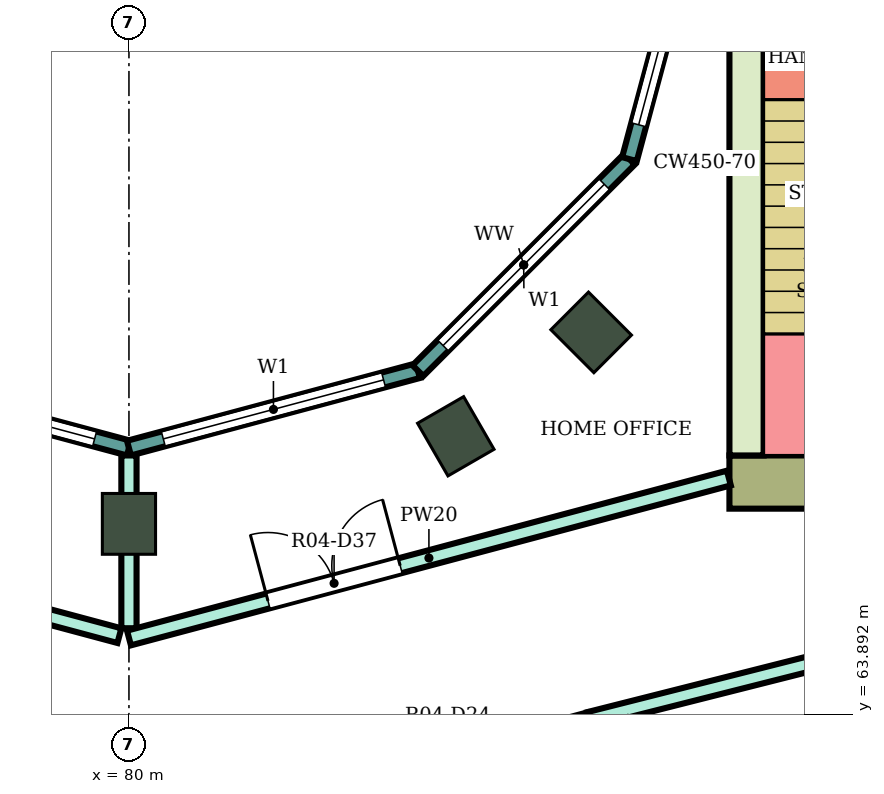
"""IFC4 building model, lengths in metres.
Left out: names, types, materials, properties, quantities, classifications, styles, units other than length and angle.
Written with IfcOpenShell. Run it as: python <this file> out.ifc"""

import sys

from ifc_helpers import new_model, si_unit, direction, frame, frame_2d, origin, origin_2d, place, context, subcontext, project, spatial, rectangle, extrude, element, fill, save


model = new_model("IFC4")
c1 = context("Model", 3, precision=1e-05, world=origin(), true_north=direction((0.0, 1.0)))
c2 = subcontext(c1, "Body", "Model", "MODEL_VIEW")
j1 = project(units=[si_unit("LENGTHUNIT", "METRE"), si_unit("PLANEANGLEUNIT", "RADIAN")], contexts=[c1])
p1 = place(None, origin())
s1 = spatial("IfcSite", under=j1, at=p1, CompositionType="ELEMENT")
p2 = place(p1, origin())
s2 = spatial("IfcBuilding", under=s1, at=p2, CompositionType="ELEMENT")
p3 = place(p2, frame((0.0, 0.0, 194.6)))
s3 = spatial("IfcBuildingStorey", under=s2, at=p3, CompositionType="ELEMENT", Elevation=194.6)
for number, where, z_axis, x_axis in (
    (1, (80.0, 66.4, 0.0), (0.0, 0.0, 1.0), (0.0, -1.0, 0.0)),
    (2, (84.3, 67.552, 0.0), (0.0, 0.0, 1.0), (0.5, -0.866, 0.0)),
    (3, (86.081, 68.919, 0.0), (0.0, 0.0, 1.0), (0.707, -0.707, 0.0)),
):
    element("IfcColumn", number, at=place(p3, frame(where, z_axis=z_axis, x_axis=x_axis)), inside=s3, PredefinedType="COLUMN", context=c2, shape_type="SweptSolid", body=[
        extrude(rectangle(XDim=0.8, YDim=0.7, at=origin_2d()), origin(), (0.0, 0.0, 1.0), 4.1),
    ])
p4 = place(p3, frame((87.9, 66.95, 0.0), z_axis=(0.0, 0.0, 1.0), x_axis=(1.0, 0.0, 0.0)))
e4 = element("IfcWall", 4, at=p4, inside=s3, PredefinedType="SHEAR", context=c2, shape_type="SweptSolid", body=[
    extrude(rectangle(XDim=14.8, YDim=0.7, at=frame_2d((7.4, 0.0))), origin(), (0.0, 0.0, 1.0), 3.78),
])
p5 = place(p4, frame((4.2, 0.0, 0.0)))
e5 = element("IfcOpeningElement", 5, at=p5, cuts=e4, PredefinedType="OPENING", context=c2, shape_type="SweptSolid", body=[
    extrude(rectangle(XDim=2.4, YDim=2.4, at=frame_2d((1.2, 1.2))), frame((0.0, 0.36, 0.0), z_axis=(0.0, -1.0, 0.0), x_axis=(1.0, 0.0, 0.0)), (0.0, 0.0, 1.0), 0.72),
])
p6 = place(p3, frame((88.125, 67.3, 0.0), z_axis=(0.0, 0.0, 1.0), x_axis=(0.0, 1.0, 0.0)))
e6 = element("IfcWall", 6, at=p6, inside=s3, PredefinedType="SHEAR", context=c2, shape_type="SweptSolid", body=[
    extrude(rectangle(XDim=7.7, YDim=0.45, at=frame_2d((3.85, 0.0))), origin(), (0.0, 0.0, 1.0), 3.78),
])
p7 = place(p3, frame((76.198, 68.415, 0.0), z_axis=(0.0, 0.0, 1.0), x_axis=(0.965933654434, -0.258789828301, 0.0)))
e7 = element("IfcWall", 7, at=p7, inside=s3, PredefinedType="NOTDEFINED", context=c2, shape_type="SweptSolid", body=[
    extrude(rectangle(XDim=3.936, YDim=0.2, at=frame_2d((1.968, 0.0))), origin(), (0.0, 0.0, 1.0), 4.1),
])
p8 = place(p7, frame((0.468, 0.0, 0.9)))
e8 = element("IfcOpeningElement", 8, at=p8, cuts=e7, PredefinedType="OPENING", context=c2, shape_type="SweptSolid", body=[
    extrude(rectangle(XDim=3.0, YDim=2.3, at=frame_2d((1.5, 1.15))), frame((0.0, 0.11, 0.0), z_axis=(0.0, -1.0, 0.0), x_axis=(1.0, 0.0, 0.0)), (0.0, 0.0, 1.0), 0.22),
])
p9 = place(p3, frame((80.0, 67.396, 0.0), z_axis=(0.0, 0.0, 1.0), x_axis=(0.965933654434, 0.258789828301, 0.0)))
e9 = element("IfcWall", 9, at=p9, inside=s3, PredefinedType="NOTDEFINED", context=c2, shape_type="SweptSolid", body=[
    extrude(rectangle(XDim=3.936, YDim=0.2, at=frame_2d((1.968, 0.0))), origin(), (0.0, 0.0, 1.0), 4.1),
])
p10 = place(p9, frame((0.468, 0.0, 0.9)))
e10 = element("IfcOpeningElement", 10, at=p10, cuts=e9, PredefinedType="OPENING", context=c2, shape_type="SweptSolid", body=[
    extrude(rectangle(XDim=3.0, YDim=2.3, at=frame_2d((1.5, 1.15))), frame((0.0, 0.11, 0.0), z_axis=(0.0, -1.0, 0.0), x_axis=(1.0, 0.0, 0.0)), (0.0, 0.0, 1.0), 0.22),
])
p11 = place(p3, frame((83.802, 68.415, 0.0), z_axis=(0.0, 0.0, 1.0), x_axis=(0.707106781187, 0.707106781187, 0.0)))
e11 = element("IfcWall", 11, at=p11, inside=s3, PredefinedType="NOTDEFINED", context=c2, shape_type="SweptSolid", body=[
    extrude(rectangle(XDim=3.936, YDim=0.2, at=frame_2d((1.968, 0.0))), origin(), (0.0, 0.0, 1.0), 4.1),
])
p12 = place(p11, frame((0.468, 0.0, 0.9)))
e12 = element("IfcOpeningElement", 12, at=p12, cuts=e11, PredefinedType="OPENING", context=c2, shape_type="SweptSolid", body=[
    extrude(rectangle(XDim=3.0, YDim=2.3, at=frame_2d((1.5, 1.15))), frame((0.0, 0.11, 0.0), z_axis=(0.0, -1.0, 0.0), x_axis=(1.0, 0.0, 0.0)), (0.0, 0.0, 1.0), 0.22),
])
p13 = place(p3, frame((86.585, 71.198, 0.0), z_axis=(0.0, 0.0, 1.0), x_axis=(0.258789828301, 0.965933654434, 0.0)))
e13 = element("IfcWall", 13, at=p13, inside=s3, PredefinedType="NOTDEFINED", context=c2, shape_type="SweptSolid", body=[
    extrude(rectangle(XDim=3.936, YDim=0.2, at=frame_2d((1.968, 0.0))), origin(), (0.0, 0.0, 1.0), 4.1),
])
p14 = place(p13, frame((0.468, 0.0, 0.9)))
e14 = element("IfcOpeningElement", 14, at=p14, cuts=e13, PredefinedType="OPENING", context=c2, shape_type="SweptSolid", body=[
    extrude(rectangle(XDim=3.0, YDim=2.3, at=frame_2d((1.5, 1.15))), frame((0.0, 0.11, 0.0), z_axis=(0.0, -1.0, 0.0), x_axis=(1.0, 0.0, 0.0)), (0.0, 0.0, 1.0), 0.22),
])
p15 = place(p3, frame((73.947, 63.826, 0.0), z_axis=(0.0, 0.0, 1.0), x_axis=(0.965908253407, -0.258884619088, 0.0)))
e15 = element("IfcWall", 15, at=p15, inside=s3, PredefinedType="PARTITIONING", context=c2, shape_type="SweptSolid", body=[
    extrude(rectangle(XDim=6.217, YDim=0.2, at=frame_2d((3.108, 0.0))), origin(), (0.0, 0.0, 1.0), 3.65),
])
p16 = place(p15, frame((1.424, 0.0, 0.0)))
e16 = element("IfcOpeningElement", 16, at=p16, cuts=e15, PredefinedType="OPENING", context=c2, shape_type="SweptSolid", body=[
    extrude(rectangle(XDim=1.0, YDim=2.1, at=frame_2d((0.5, 1.05))), frame((0.0, 0.11, 0.0), z_axis=(0.0, -1.0, 0.0), x_axis=(1.0, 0.0, 0.0)), (0.0, 0.0, 1.0), 0.22),
])
p17 = place(p3, frame((74.603, 66.342, 0.0), z_axis=(0.0, 0.0, 1.0), x_axis=(0.965920893652, -0.258837453254, 0.0)))
e17 = element("IfcWall", 17, at=p17, inside=s3, PredefinedType="PARTITIONING", context=c2, shape_type="SweptSolid", body=[
    extrude(rectangle(XDim=5.458, YDim=0.2, at=frame_2d((2.729, 0.0))), origin(), (0.0, 0.0, 1.0), 3.65),
])
p18 = place(p17, frame((2.512, 0.0, 0.0)))
e18 = element("IfcOpeningElement", 18, at=p18, cuts=e17, PredefinedType="OPENING", context=c2, shape_type="SweptSolid", body=[
    extrude(rectangle(XDim=0.9, YDim=2.1, at=frame_2d((0.45, 1.05))), frame((0.0, 0.11, 0.0), z_axis=(0.0, -1.0, 0.0), x_axis=(1.0, 0.0, 0.0)), (0.0, 0.0, 1.0), 0.22),
])
p19 = place(p3, frame((80.048, 62.217, 0.0), z_axis=(0.0, 0.0, 1.0), x_axis=(0.966097920642, 0.258175923996, 0.0)))
e19 = element("IfcWall", 19, at=p19, inside=s3, PredefinedType="PARTITIONING", context=c2, shape_type="SweptSolid", body=[
    extrude(rectangle(XDim=6.217, YDim=0.2, at=frame_2d((3.108, 0.0))), origin(), (0.0, 0.0, 1.0), 3.65),
])
p20 = place(p19, frame((3.792, 0.0, 0.0)))
e20 = element("IfcOpeningElement", 20, at=p20, cuts=e19, PredefinedType="OPENING", context=c2, shape_type="SweptSolid", body=[
    extrude(rectangle(XDim=1.0, YDim=2.1, at=frame_2d((0.5, 1.05))), frame((0.0, 0.11, 0.0), z_axis=(0.0, -1.0, 0.0), x_axis=(1.0, 0.0, 0.0)), (0.0, 0.0, 1.0), 0.22),
])
p21 = place(p3, frame((80.0, 65.027, 0.0), z_axis=(0.0, 0.0, 1.0), x_axis=(0.0, 1.0, 0.0)))
e21 = element("IfcWall", 21, at=p21, inside=s3, PredefinedType="PARTITIONING", context=c2, shape_type="SweptSolid", body=[
    extrude(rectangle(XDim=2.273, YDim=0.2, at=frame_2d((1.136, 0.0))), origin(), (0.0, 0.0, 1.0), 3.65),
])
p22 = place(p3, frame((80.0, 64.898, 0.0), z_axis=(0.0, 0.0, 1.0), x_axis=(0.966236923997, 0.25765520896, 0.0)))
e22 = element("IfcWall", 22, at=p22, inside=s3, PredefinedType="PARTITIONING", context=c2, shape_type="SweptSolid", body=[
    extrude(rectangle(XDim=8.168, YDim=0.2, at=frame_2d((4.084, 0.0))), origin(), (0.0, 0.0, 1.0), 3.65),
])
p23 = place(p22, frame((1.893, 0.0, 0.0)))
e23 = element("IfcOpeningElement", 23, at=p23, cuts=e22, PredefinedType="OPENING", context=c2, shape_type="SweptSolid", body=[
    extrude(rectangle(XDim=1.8, YDim=2.1, at=frame_2d((0.9, 1.05))), frame((0.0, 0.11, 0.0), z_axis=(0.0, -1.0, 0.0), x_axis=(1.0, 0.0, 0.0)), (0.0, 0.0, 1.0), 0.22),
])
p24 = place(p3, frame((86.053, 63.826, 0.0), z_axis=(0.0, 0.0, 1.0), x_axis=(0.969490004987, 0.245130843083, 0.0)))
e24 = element("IfcWall", 24, at=p24, inside=s3, PredefinedType="PARTITIONING", context=c2, shape_type="SweptSolid", body=[
    extrude(rectangle(XDim=5.908, YDim=0.2, at=frame_2d((2.954, 0.0))), origin(), (0.0, 0.0, 1.0), 3.65),
])
p25 = place(p8, origin())
e25 = element("IfcWindow", 25, at=p25, inside=s3, PartitioningType="SINGLE_PANEL", PredefinedType="WINDOW", context=c2, shape_type="SweptSolid", body=[
    extrude(rectangle(XDim=3.0, YDim=2.3, at=frame_2d((1.5, 1.15))), frame((0.0, 0.03, 0.0), z_axis=(0.0, -1.0, 0.0), x_axis=(1.0, 0.0, 0.0)), (0.0, 0.0, 1.0), 0.06),
])
fill(e8, e25)
p26 = place(p10, origin())
e26 = element("IfcWindow", 26, at=p26, inside=s3, PartitioningType="SINGLE_PANEL", PredefinedType="WINDOW", context=c2, shape_type="SweptSolid", body=[
    extrude(rectangle(XDim=3.0, YDim=2.3, at=frame_2d((1.5, 1.15))), frame((0.0, 0.03, 0.0), z_axis=(0.0, -1.0, 0.0), x_axis=(1.0, 0.0, 0.0)), (0.0, 0.0, 1.0), 0.06),
])
fill(e10, e26)
p27 = place(p12, origin())
e27 = element("IfcWindow", 27, at=p27, inside=s3, PartitioningType="SINGLE_PANEL", PredefinedType="WINDOW", context=c2, shape_type="SweptSolid", body=[
    extrude(rectangle(XDim=3.0, YDim=2.3, at=frame_2d((1.5, 1.15))), frame((0.0, 0.03, 0.0), z_axis=(0.0, -1.0, 0.0), x_axis=(1.0, 0.0, 0.0)), (0.0, 0.0, 1.0), 0.06),
])
fill(e12, e27)
p28 = place(p14, origin())
e28 = element("IfcWindow", 28, at=p28, inside=s3, PartitioningType="SINGLE_PANEL", PredefinedType="WINDOW", context=c2, shape_type="SweptSolid", body=[
    extrude(rectangle(XDim=3.0, YDim=2.3, at=frame_2d((1.5, 1.15))), frame((0.0, 0.03, 0.0), z_axis=(0.0, -1.0, 0.0), x_axis=(1.0, 0.0, 0.0)), (0.0, 0.0, 1.0), 0.06),
])
fill(e14, e28)
p29 = place(p23, origin())
e29 = element("IfcDoor", 29, at=p29, inside=s3, OperationType="DOUBLE_DOOR_SINGLE_SWING", PredefinedType="DOOR", context=c2, shape_type="SweptSolid", body=[
    extrude(rectangle(XDim=1.8, YDim=2.1, at=frame_2d((0.9, 1.05))), frame((0.0, 0.025, 0.0), z_axis=(0.0, -1.0, 0.0), x_axis=(1.0, 0.0, 0.0)), (0.0, 0.0, 1.0), 0.05),
])
fill(e23, e29)
save(model, sys.argv[1])
